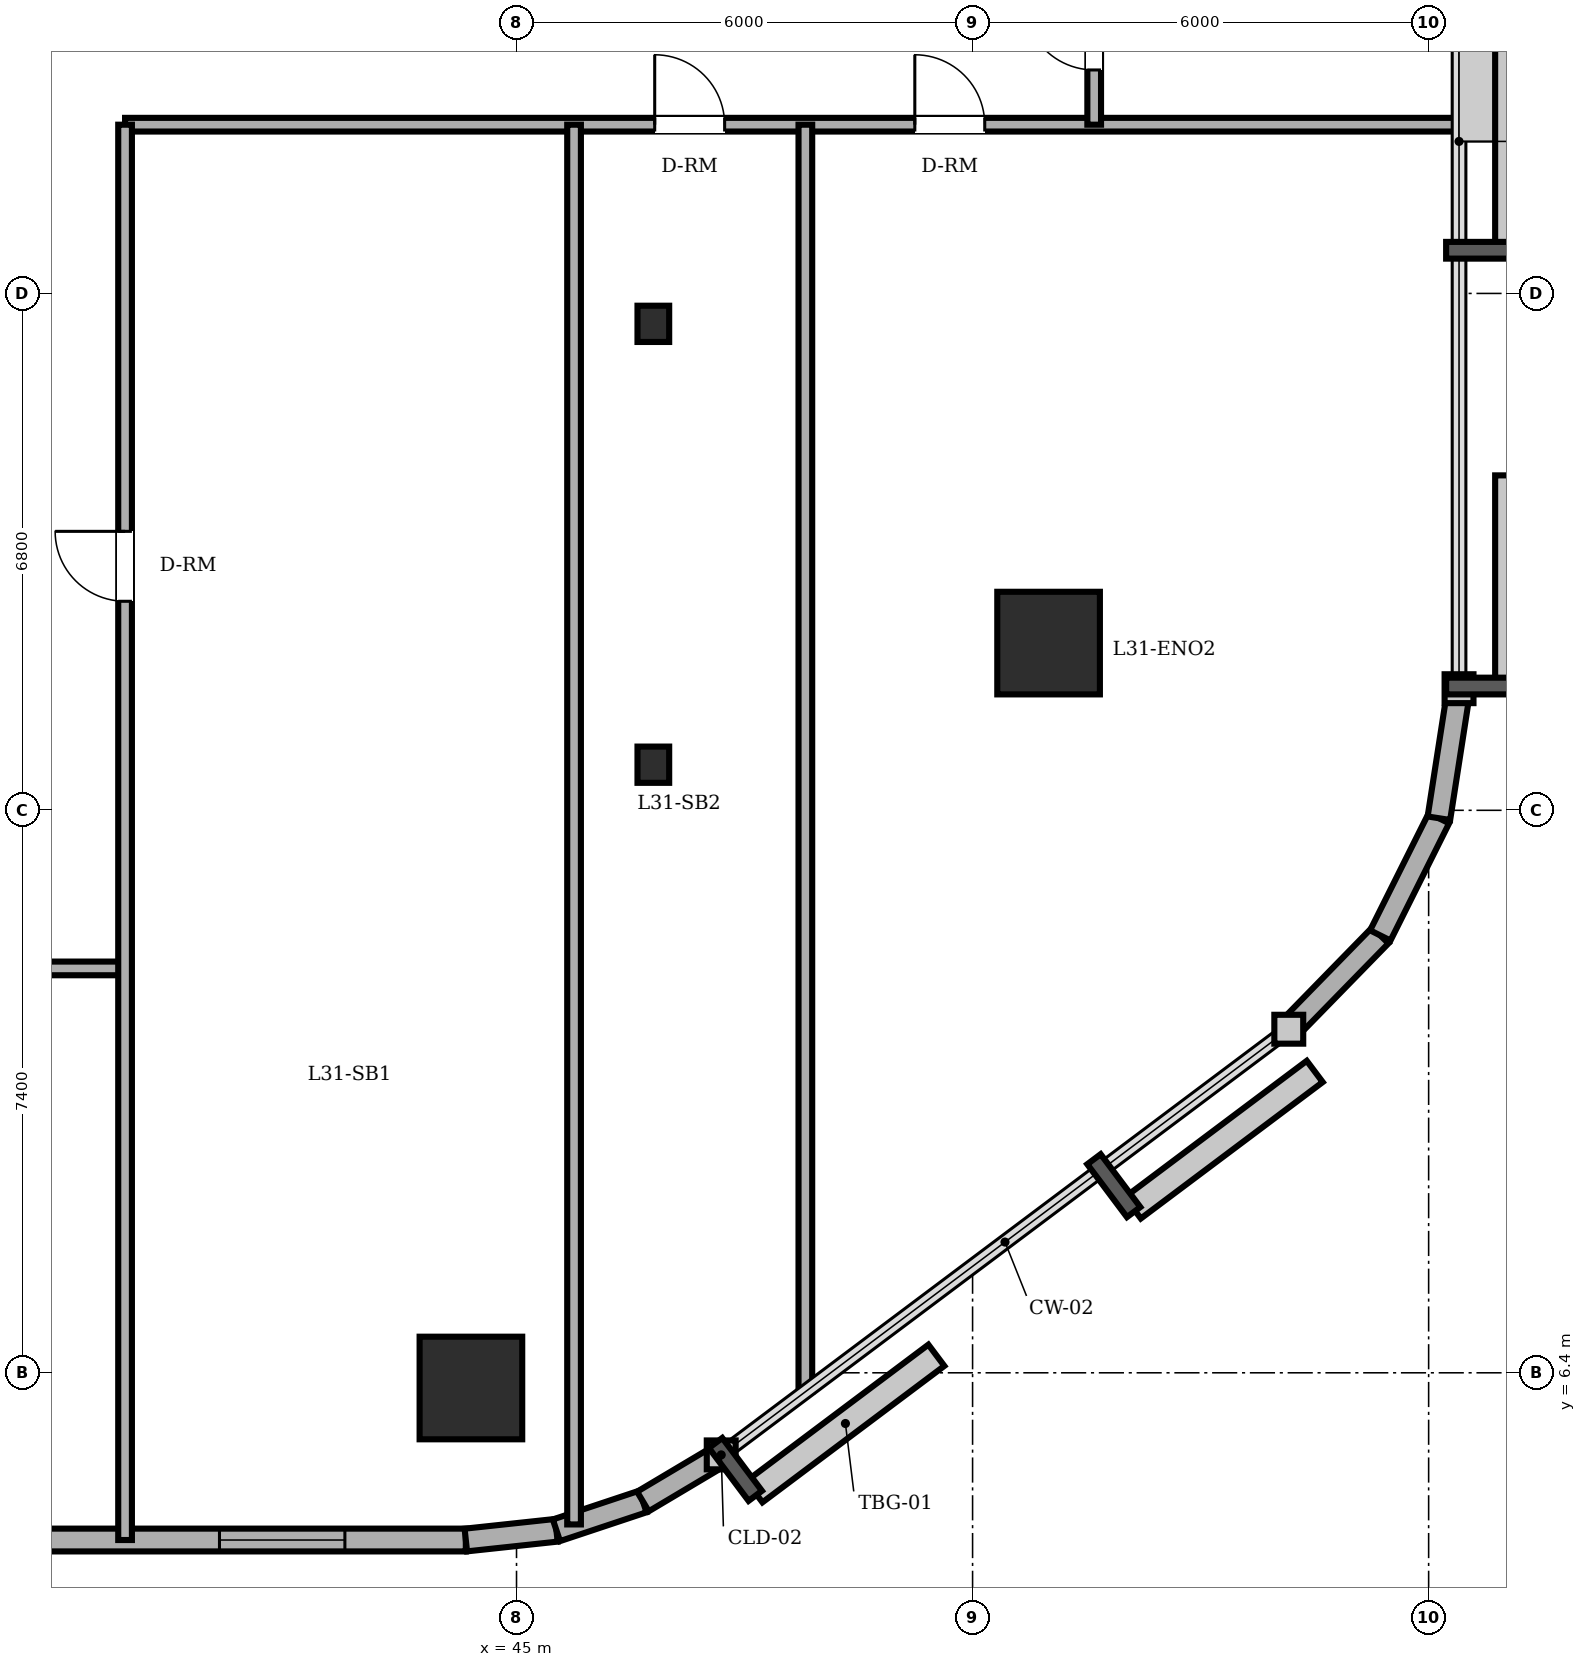
"""IFC4 building model, lengths in metres.
Left out: names, types, materials, properties, quantities, classifications, styles, units other than length and angle.
Written with IfcOpenShell. Run it as: python <this file> out.ifc"""

import sys

from ifc_helpers import new_model, si_unit, direction, frame, frame_2d, origin, origin_2d, place, context, subcontext, project, spatial, rectangle, circle, i_section, extrude, element, fill, save


model = new_model("IFC4")
c1 = context("Model", 3, precision=1e-05, world=origin(), true_north=direction((0.0, 1.0)))
c2 = subcontext(c1, "Body", "Model", "MODEL_VIEW")
j1 = project(units=[si_unit("LENGTHUNIT", "METRE"), si_unit("PLANEANGLEUNIT", "RADIAN")], contexts=[c1])
p1 = place(None, origin())
s1 = spatial("IfcSite", under=j1, at=p1, CompositionType="ELEMENT")
p2 = place(p1, origin())
s2 = spatial("IfcBuilding", under=s1, at=p2, CompositionType="ELEMENT")
p3 = place(p2, frame((0.0, 0.0, 118.7)))
s3 = spatial("IfcBuildingStorey", under=s2, at=p3, CompositionType="ELEMENT", Elevation=118.7)
for number, where, z_axis, x_axis in (
    (1, (44.4, 6.2, 0.0), (0.0, 0.0, 1.0), (1.0, 0.0, 0.0)),
    (2, (52.0, 16.0, 0.0), (0.0, 0.0, 1.0), (1.0, 0.0, 0.0)),
):
    element("IfcColumn", number, at=place(p3, frame(where, z_axis=z_axis, x_axis=x_axis)), inside=s3, PredefinedType="COLUMN", context=c2, shape_type="SweptSolid", body=[
        extrude(circle(Radius=0.675, at=origin_2d()), origin(), (0.0, 0.0, 1.0), 3.6),
    ])
for number, where, z_axis, x_axis in (
    (3, (46.8, 14.4, 0.0), (0.0, 0.0, 1.0), (1.0, 0.0, 0.0)),
    (4, (46.8, 20.2, 0.0), (0.0, 0.0, 1.0), (1.0, 0.0, 0.0)),
):
    element("IfcColumn", number, at=place(p3, frame(where, z_axis=z_axis, x_axis=x_axis)), inside=s3, PredefinedType="COLUMN", context=c2, shape_type="SweptSolid", body=[
        extrude(i_section(OverallWidth=0.417, OverallDepth=0.477, WebThickness=0.036, FlangeThickness=0.057, FilletRadius=0.015, at=origin_2d()), origin(), (0.0, 0.0, 1.0), 3.6),
    ])
p4 = place(p3, frame((14.4, 4.2, 0.0), z_axis=(0.0, 0.0, 1.0), x_axis=(1.0, 0.0, 0.0)))
e5 = element("IfcWall", 5, at=p4, inside=s3, PredefinedType="SOLIDWALL", context=c2, shape_type="SweptSolid", body=[
    extrude(rectangle(XDim=29.933, YDim=0.3, at=frame_2d((14.967, 0.0))), origin(), (0.0, 0.0, 1.0), 3.4),
])
p5 = place(p4, frame((5.225, 0.0, 0.0)))
e6 = element("IfcOpeningElement", 6, at=p5, cuts=e5, PredefinedType="OPENING", context=c2, shape_type="SweptSolid", body=[
    extrude(rectangle(XDim=0.95, YDim=2.2, at=frame_2d((0.475, 1.1))), frame((0.0, 0.16, 0.0), z_axis=(0.0, -1.0, 0.0), x_axis=(1.0, 0.0, 0.0)), (0.0, 0.0, 1.0), 0.32),
])
p6 = place(p4, frame((2.808, 0.0, 0.85)))
e7 = element("IfcOpeningElement", 7, at=p6, cuts=e5, PredefinedType="OPENING", context=c2, shape_type="SweptSolid", body=[
    extrude(rectangle(XDim=1.65, YDim=1.55, at=frame_2d((0.825, 0.775))), frame((0.0, 0.16, 0.0), z_axis=(0.0, -1.0, 0.0), x_axis=(1.0, 0.0, 0.0)), (0.0, 0.0, 1.0), 0.32),
])
p7 = place(p4, frame((11.275, 0.0, 0.85)))
e8 = element("IfcOpeningElement", 8, at=p7, cuts=e5, PredefinedType="OPENING", context=c2, shape_type="SweptSolid", body=[
    extrude(rectangle(XDim=1.65, YDim=1.55, at=frame_2d((0.825, 0.775))), frame((0.0, 0.16, 0.0), z_axis=(0.0, -1.0, 0.0), x_axis=(1.0, 0.0, 0.0)), (0.0, 0.0, 1.0), 0.32),
])
p8 = place(p4, frame((16.992, 0.0, 0.85)))
e9 = element("IfcOpeningElement", 9, at=p8, cuts=e5, PredefinedType="OPENING", context=c2, shape_type="SweptSolid", body=[
    extrude(rectangle(XDim=1.65, YDim=1.55, at=frame_2d((0.825, 0.775))), frame((0.0, 0.16, 0.0), z_axis=(0.0, -1.0, 0.0), x_axis=(1.0, 0.0, 0.0)), (0.0, 0.0, 1.0), 0.32),
])
p9 = place(p4, frame((20.808, 0.0, 0.85)))
e10 = element("IfcOpeningElement", 10, at=p9, cuts=e5, PredefinedType="OPENING", context=c2, shape_type="SweptSolid", body=[
    extrude(rectangle(XDim=1.65, YDim=1.55, at=frame_2d((0.825, 0.775))), frame((0.0, 0.16, 0.0), z_axis=(0.0, -1.0, 0.0), x_axis=(1.0, 0.0, 0.0)), (0.0, 0.0, 1.0), 0.32),
])
p10 = place(p4, frame((26.692, 0.0, 0.85)))
e11 = element("IfcOpeningElement", 11, at=p10, cuts=e5, PredefinedType="OPENING", context=c2, shape_type="SweptSolid", body=[
    extrude(rectangle(XDim=1.65, YDim=1.55, at=frame_2d((0.825, 0.775))), frame((0.0, 0.16, 0.0), z_axis=(0.0, -1.0, 0.0), x_axis=(1.0, 0.0, 0.0)), (0.0, 0.0, 1.0), 0.32),
])
p11 = place(p3, frame((44.333, 4.2, 0.0), z_axis=(0.0, 0.0, 1.0), x_axis=(0.994289103787, 0.106720092254, 0.0)))
e12 = element("IfcWall", 12, at=p11, inside=s3, PredefinedType="SOLIDWALL", context=c2, shape_type="SweptSolid", body=[
    extrude(rectangle(XDim=1.199, YDim=0.3, at=frame_2d((0.599, 0.0))), origin(), (0.0, 0.0, 1.0), 3.4),
])
p12 = place(p3, frame((45.525, 4.328, 0.0), z_axis=(0.0, 0.0, 1.0), x_axis=(0.948744332129, 0.316044604847, 0.0)))
e13 = element("IfcWall", 13, at=p12, inside=s3, PredefinedType="SOLIDWALL", context=c2, shape_type="SweptSolid", body=[
    extrude(rectangle(XDim=1.2, YDim=0.3, at=frame_2d((0.6, 0.0))), origin(), (0.0, 0.0, 1.0), 3.4),
])
p13 = place(p3, frame((46.663, 4.707, 0.0), z_axis=(0.0, 0.0, 1.0), x_axis=(0.859320591642, 0.511437308749, 0.0)))
e14 = element("IfcWall", 14, at=p13, inside=s3, PredefinedType="SOLIDWALL", context=c2, shape_type="SweptSolid", body=[
    extrude(rectangle(XDim=1.199, YDim=0.3, at=frame_2d((0.599, 0.0))), origin(), (0.0, 0.0, 1.0), 3.4),
])
for number, where, z_axis, x_axis in (
    (15, (55.16, 10.92, 0.0), (0.0, 0.0, 1.0), (0.698, 0.716, 0.0)),
    (16, (56.364, 12.154, 0.0), (0.0, 0.0, 1.0), (0.447, 0.894, 0.0)),
):
    element("IfcWall", number, at=place(p3, frame(where, z_axis=z_axis, x_axis=x_axis)), inside=s3, PredefinedType="SOLIDWALL", context=c2, shape_type="SweptSolid", body=[
        extrude(rectangle(XDim=1.724, YDim=0.3, at=frame_2d((0.862, 0.0))), origin(), (0.0, 0.0, 1.0), 3.4),
    ])
p14 = place(p3, frame((57.135, 13.696, 0.0), z_axis=(0.0, 0.0, 1.0), x_axis=(0.153620989032, 0.988129845581, 0.0)))
e17 = element("IfcWall", 17, at=p14, inside=s3, PredefinedType="SOLIDWALL", context=c2, shape_type="SweptSolid", body=[
    extrude(rectangle(XDim=1.724, YDim=0.3, at=frame_2d((0.862, 0.0))), origin(), (0.0, 0.0, 1.0), 3.4),
])
p15 = place(p3, frame((8.8, 11.72, 0.0), z_axis=(0.0, 0.0, 1.0), x_axis=(1.0, 0.0, 0.0)))
e18 = element("IfcWall", 18, at=p15, inside=s3, PredefinedType="PARTITIONING", context=c2, shape_type="SweptSolid", body=[
    extrude(rectangle(XDim=31.05, YDim=0.18, at=frame_2d((15.525, 0.0))), origin(), (0.0, 0.0, 1.0), 3.4),
])
p16 = place(p15, frame((17.24, 0.0, 0.0)))
e19 = element("IfcOpeningElement", 19, at=p16, cuts=e18, PredefinedType="OPENING", context=c2, shape_type="SweptSolid", body=[
    extrude(rectangle(XDim=0.92, YDim=2.1, at=frame_2d((0.46, 1.05))), frame((0.0, 0.1, 0.0), z_axis=(0.0, -1.0, 0.0), x_axis=(1.0, 0.0, 0.0)), (0.0, 0.0, 1.0), 0.2),
])
p17 = place(p15, frame((8.04, 0.0, 0.0)))
e20 = element("IfcOpeningElement", 20, at=p17, cuts=e18, PredefinedType="OPENING", context=c2, shape_type="SweptSolid", body=[
    extrude(rectangle(XDim=0.92, YDim=2.1, at=frame_2d((0.46, 1.05))), frame((0.0, 0.1, 0.0), z_axis=(0.0, -1.0, 0.0), x_axis=(1.0, 0.0, 0.0)), (0.0, 0.0, 1.0), 0.2),
])
p18 = place(p15, frame((24.605, 0.0, 0.0)))
e21 = element("IfcOpeningElement", 21, at=p18, cuts=e18, PredefinedType="OPENING", context=c2, shape_type="SweptSolid", body=[
    extrude(rectangle(XDim=0.92, YDim=2.1, at=frame_2d((0.46, 1.05))), frame((0.0, 0.1, 0.0), z_axis=(0.0, -1.0, 0.0), x_axis=(1.0, 0.0, 0.0)), (0.0, 0.0, 1.0), 0.2),
])
p19 = place(p3, frame((39.85, 22.82, 0.0), z_axis=(0.0, 0.0, 1.0), x_axis=(1.0, 0.0, 0.0)))
e22 = element("IfcWall", 22, at=p19, inside=s3, PredefinedType="PARTITIONING", context=c2, shape_type="SweptSolid", body=[
    extrude(rectangle(XDim=17.55, YDim=0.18, at=frame_2d((8.775, 0.0))), origin(), (0.0, 0.0, 1.0), 3.4),
])
p20 = place(p19, frame((6.968, 0.0, 0.0)))
e23 = element("IfcOpeningElement", 23, at=p20, cuts=e22, PredefinedType="OPENING", context=c2, shape_type="SweptSolid", body=[
    extrude(rectangle(XDim=0.92, YDim=2.1, at=frame_2d((0.46, 1.05))), frame((0.0, 0.1, 0.0), z_axis=(0.0, -1.0, 0.0), x_axis=(1.0, 0.0, 0.0)), (0.0, 0.0, 1.0), 0.2),
])
p21 = place(p19, frame((10.39, 0.0, 0.0)))
e24 = element("IfcOpeningElement", 24, at=p21, cuts=e22, PredefinedType="OPENING", context=c2, shape_type="SweptSolid", body=[
    extrude(rectangle(XDim=0.92, YDim=2.1, at=frame_2d((0.46, 1.05))), frame((0.0, 0.1, 0.0), z_axis=(0.0, -1.0, 0.0), x_axis=(1.0, 0.0, 0.0)), (0.0, 0.0, 1.0), 0.2),
])
p22 = place(p3, frame((39.85, 4.2, 0.0), z_axis=(0.0, 0.0, 1.0), x_axis=(0.0, 1.0, 0.0)))
e25 = element("IfcWall", 25, at=p22, inside=s3, PredefinedType="PARTITIONING", context=c2, shape_type="SweptSolid", body=[
    extrude(rectangle(XDim=18.62, YDim=0.18, at=frame_2d((9.31, 0.0))), origin(), (0.0, 0.0, 1.0), 3.4),
])
p23 = place(p22, frame((12.35, 0.0, 0.0)))
e26 = element("IfcOpeningElement", 26, at=p23, cuts=e25, PredefinedType="OPENING", context=c2, shape_type="SweptSolid", body=[
    extrude(rectangle(XDim=0.92, YDim=2.1, at=frame_2d((0.46, 1.05))), frame((0.0, 0.1, 0.0), z_axis=(0.0, -1.0, 0.0), x_axis=(1.0, 0.0, 0.0)), (0.0, 0.0, 1.0), 0.2),
])
p24 = place(p3, frame((45.757, 4.405, 0.0), z_axis=(0.0, 0.0, 1.0), x_axis=(0.0, 1.0, 0.0)))
e27 = element("IfcWall", 27, at=p24, inside=s3, PredefinedType="PARTITIONING", context=c2, shape_type="SweptSolid", body=[
    extrude(rectangle(XDim=18.415, YDim=0.18, at=frame_2d((9.208, 0.0))), origin(), (0.0, 0.0, 1.0), 2.882),
])
p25 = place(p3, frame((48.8, 6.15, 0.0), z_axis=(0.0, 0.0, 1.0), x_axis=(0.0, 1.0, 0.0)))
e28 = element("IfcWall", 28, at=p25, inside=s3, PredefinedType="PARTITIONING", context=c2, shape_type="SweptSolid", body=[
    extrude(rectangle(XDim=16.67, YDim=0.18, at=frame_2d((8.335, 0.0))), origin(), (0.0, 0.0, 1.0), 3.4),
])
p26 = place(p3, frame((52.6, 22.82, 0.0), z_axis=(0.0, 0.0, 1.0), x_axis=(0.0, 1.0, 0.0)))
e29 = element("IfcWall", 29, at=p26, inside=s3, PredefinedType="PARTITIONING", context=c2, shape_type="SweptSolid", body=[
    extrude(rectangle(XDim=2.36, YDim=0.18, at=frame_2d((1.18, 0.0))), origin(), (0.0, 0.0, 1.0), 3.4),
])
p27 = place(p26, frame((0.72, 0.0, 0.0)))
e30 = element("IfcOpeningElement", 30, at=p27, cuts=e29, PredefinedType="OPENING", context=c2, shape_type="SweptSolid", body=[
    extrude(rectangle(XDim=0.92, YDim=2.1, at=frame_2d((0.46, 1.05))), frame((0.0, 0.1, 0.0), z_axis=(0.0, -1.0, 0.0), x_axis=(1.0, 0.0, 0.0)), (0.0, 0.0, 1.0), 0.2),
])
p28 = place(p10, origin())
e31 = element("IfcWindow", 31, at=p28, inside=s3, PartitioningType="DOUBLE_PANEL_VERTICAL", PredefinedType="WINDOW", context=c2, shape_type="SweptSolid", body=[
    extrude(rectangle(XDim=1.65, YDim=1.55, at=frame_2d((0.825, 0.775))), frame((0.0, 0.03, 0.0), z_axis=(0.0, -1.0, 0.0), x_axis=(1.0, 0.0, 0.0)), (0.0, 0.0, 1.0), 0.06),
])
fill(e11, e31)
p29 = place(p23, origin())
e32 = element("IfcDoor", 32, at=p29, inside=s3, OperationType="SINGLE_SWING_RIGHT", PredefinedType="DOOR", context=c2, shape_type="SweptSolid", body=[
    extrude(rectangle(XDim=0.92, YDim=2.1, at=frame_2d((0.46, 1.05))), frame((0.0, 0.025, 0.0), z_axis=(0.0, -1.0, 0.0), x_axis=(1.0, 0.0, 0.0)), (0.0, 0.0, 1.0), 0.05),
])
fill(e26, e32)
p30 = place(p20, origin())
e33 = element("IfcDoor", 33, at=p30, inside=s3, OperationType="SINGLE_SWING_LEFT", PredefinedType="DOOR", context=c2, shape_type="SweptSolid", body=[
    extrude(rectangle(XDim=0.92, YDim=2.1, at=frame_2d((0.46, 1.05))), frame((0.0, 0.025, 0.0), z_axis=(0.0, -1.0, 0.0), x_axis=(1.0, 0.0, 0.0)), (0.0, 0.0, 1.0), 0.05),
])
fill(e23, e33)
p31 = place(p21, origin())
e34 = element("IfcDoor", 34, at=p31, inside=s3, OperationType="SINGLE_SWING_LEFT", PredefinedType="DOOR", context=c2, shape_type="SweptSolid", body=[
    extrude(rectangle(XDim=0.92, YDim=2.1, at=frame_2d((0.46, 1.05))), frame((0.0, 0.025, 0.0), z_axis=(0.0, -1.0, 0.0), x_axis=(1.0, 0.0, 0.0)), (0.0, 0.0, 1.0), 0.05),
])
fill(e24, e34)
p32 = place(p27, origin())
e35 = element("IfcDoor", 35, at=p32, inside=s3, OperationType="SINGLE_SWING_RIGHT", PredefinedType="DOOR", context=c2, shape_type="SweptSolid", body=[
    extrude(rectangle(XDim=0.92, YDim=2.1, at=frame_2d((0.46, 1.05))), frame((0.0, 0.025, 0.0), z_axis=(0.0, -1.0, 0.0), x_axis=(1.0, 0.0, 0.0)), (0.0, 0.0, 1.0), 0.05),
])
fill(e30, e35)
save(model, sys.argv[1])
